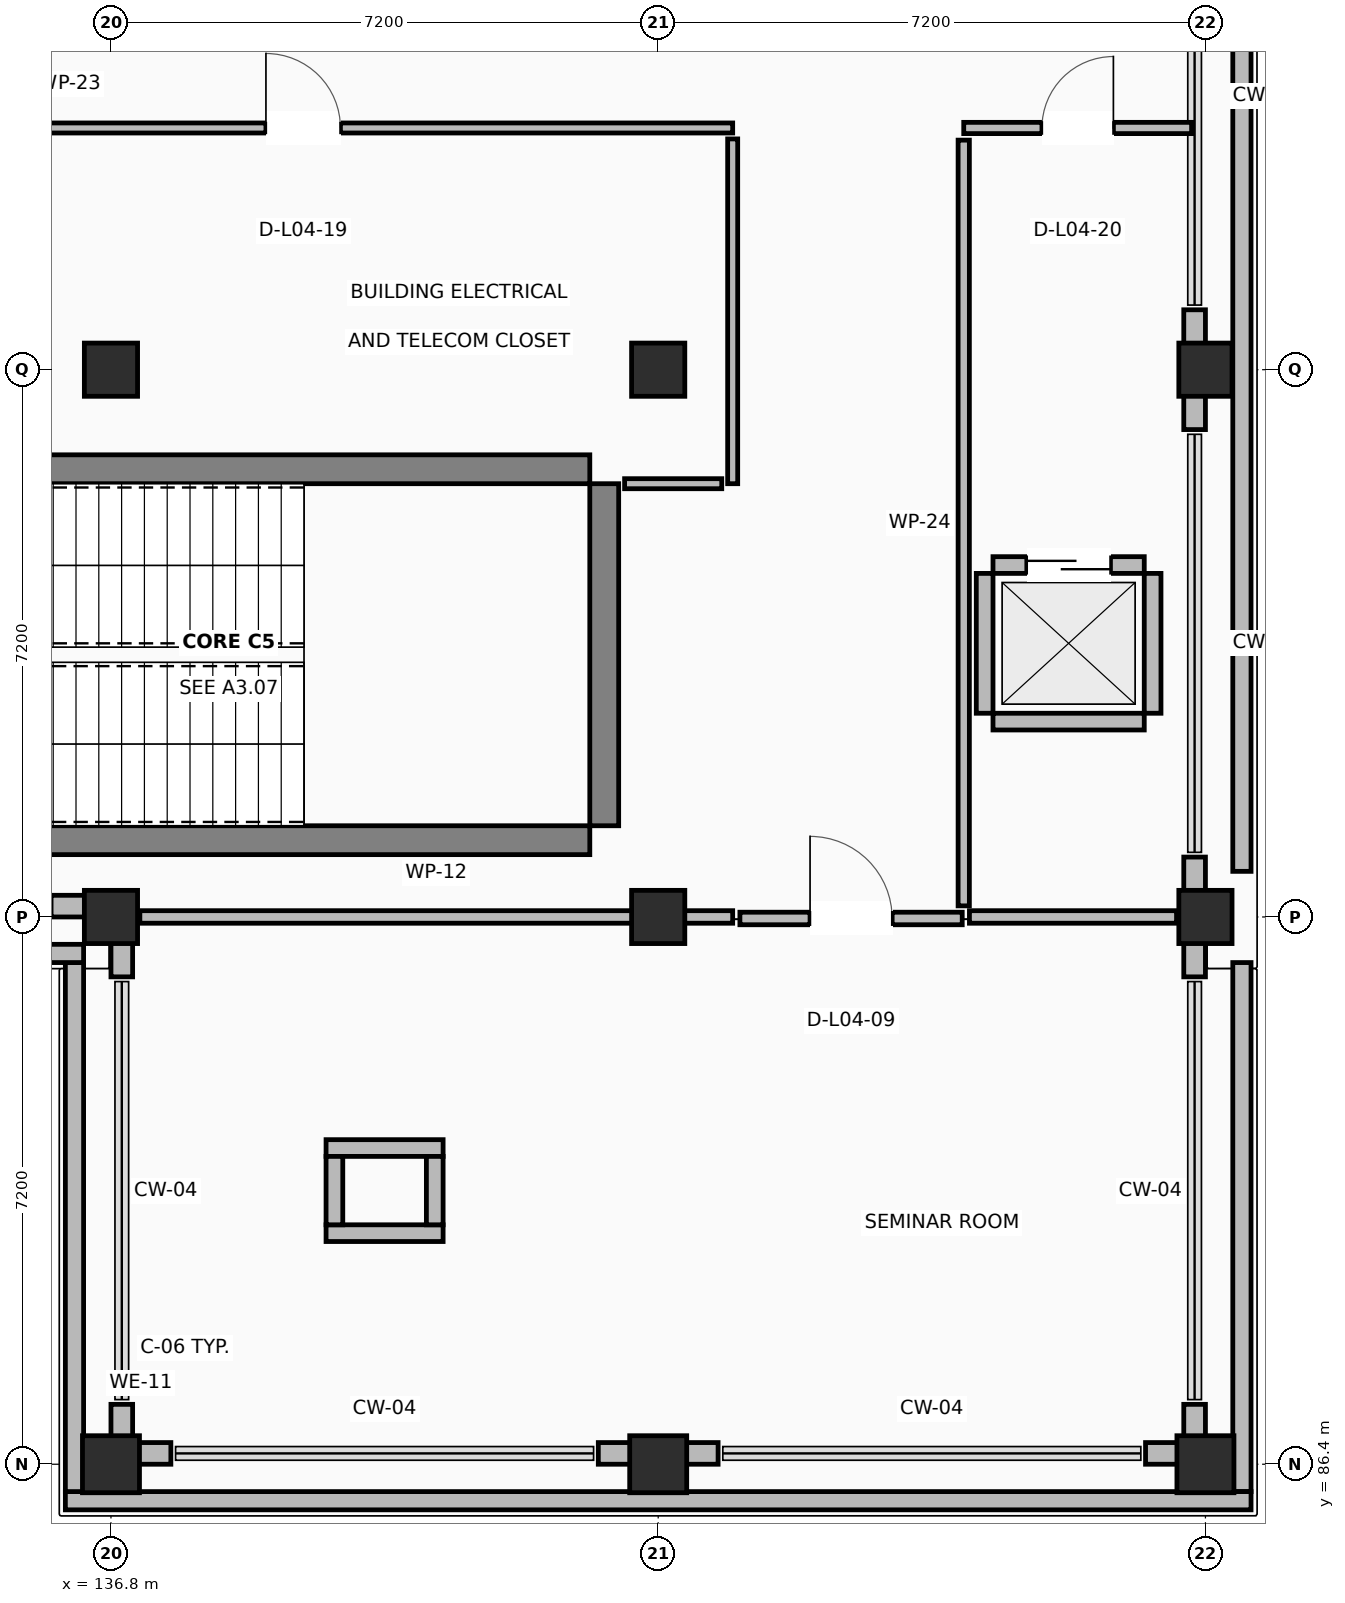
"""IFC4 building model, lengths in metres.
Left out: names, types, materials, properties, quantities, classifications, styles, units other than length and angle.
Written with IfcOpenShell. Run it as: python <this file> out.ifc"""

import sys

from ifc_helpers import new_model, si_unit, direction, frame, frame_2d, origin, origin_2d, place, context, subcontext, project, spatial, rectangle, extrude, element, fill, save


model = new_model("IFC4")
c1 = context("Model", 3, precision=1e-05, world=origin(), true_north=direction((0.0, 1.0)))
c2 = subcontext(c1, "Body", "Model", "MODEL_VIEW")
j1 = project(units=[si_unit("LENGTHUNIT", "METRE"), si_unit("PLANEANGLEUNIT", "RADIAN")], contexts=[c1])
p1 = place(None, origin())
s1 = spatial("IfcSite", under=j1, at=p1, CompositionType="ELEMENT")
p2 = place(p1, origin())
s2 = spatial("IfcBuilding", under=s1, at=p2, CompositionType="ELEMENT")
p3 = place(p2, frame((0.0, 0.0, 18.0)))
s3 = spatial("IfcBuildingStorey", under=s2, at=p3, CompositionType="ELEMENT", Elevation=18.0)
p4 = place(p3, frame((136.8, 86.4, 0.0), z_axis=(0.0, 0.0, 1.0), x_axis=(1.0, 0.0, 0.0)))
e1 = element("IfcColumn", 1, at=p4, inside=s3, PredefinedType="COLUMN", context=c2, shape_type="SweptSolid", body=[
    extrude(rectangle(XDim=0.75, YDim=0.75, at=origin_2d()), origin(), (0.0, 0.0, 1.0), 4.22),
])
for number, where, z_axis, x_axis in (
    (2, (136.8, 93.6, 0.0), (0.0, 0.0, 1.0), (1.0, 0.0, 0.0)),
    (3, (136.8, 100.8, 0.0), (0.0, 0.0, 1.0), (1.0, 0.0, 0.0)),
):
    element("IfcColumn", number, at=place(p3, frame(where, z_axis=z_axis, x_axis=x_axis)), inside=s3, PredefinedType="COLUMN", context=c2, shape_type="SweptSolid", body=[
        extrude(rectangle(XDim=0.7, YDim=0.7, at=origin_2d()), origin(), (0.0, 0.0, 1.0), 4.22),
    ])
p5 = place(p3, frame((144.0, 86.4, 0.0), z_axis=(0.0, 0.0, 1.0), x_axis=(1.0, 0.0, 0.0)))
e4 = element("IfcColumn", 4, at=p5, inside=s3, PredefinedType="COLUMN", context=c2, shape_type="SweptSolid", body=[
    extrude(rectangle(XDim=0.75, YDim=0.75, at=origin_2d()), origin(), (0.0, 0.0, 1.0), 4.22),
])
for number, where, z_axis, x_axis in (
    (5, (144.0, 93.6, 0.0), (0.0, 0.0, 1.0), (1.0, 0.0, 0.0)),
    (6, (144.0, 100.8, 0.0), (0.0, 0.0, 1.0), (1.0, 0.0, 0.0)),
):
    element("IfcColumn", number, at=place(p3, frame(where, z_axis=z_axis, x_axis=x_axis)), inside=s3, PredefinedType="COLUMN", context=c2, shape_type="SweptSolid", body=[
        extrude(rectangle(XDim=0.7, YDim=0.7, at=origin_2d()), origin(), (0.0, 0.0, 1.0), 4.22),
    ])
p6 = place(p3, frame((151.2, 86.4, 0.0), z_axis=(0.0, 0.0, 1.0), x_axis=(1.0, 0.0, 0.0)))
e7 = element("IfcColumn", 7, at=p6, inside=s3, PredefinedType="COLUMN", context=c2, shape_type="SweptSolid", body=[
    extrude(rectangle(XDim=0.75, YDim=0.75, at=origin_2d()), origin(), (0.0, 0.0, 1.0), 4.22),
])
for number, where, z_axis, x_axis in (
    (8, (151.2, 93.6, 0.0), (0.0, 0.0, 1.0), (1.0, 0.0, 0.0)),
    (9, (151.2, 100.8, 0.0), (0.0, 0.0, 1.0), (1.0, 0.0, 0.0)),
):
    element("IfcColumn", number, at=place(p3, frame(where, z_axis=z_axis, x_axis=x_axis)), inside=s3, PredefinedType="COLUMN", context=c2, shape_type="SweptSolid", body=[
        extrude(rectangle(XDim=0.7, YDim=0.7, at=origin_2d()), origin(), (0.0, 0.0, 1.0), 4.22),
    ])
for number, where, z_axis, x_axis in (
    (10, (133.6, 94.61, 0.0), (0.0, 0.0, 1.0), (1.0, 0.0, 0.0)),
    (11, (133.6, 99.49, 0.0), (0.0, 0.0, 1.0), (1.0, 0.0, 0.0)),
):
    element("IfcWall", number, at=place(p3, frame(where, z_axis=z_axis, x_axis=x_axis)), inside=s3, PredefinedType="SHEAR", context=c2, shape_type="SweptSolid", body=[
        extrude(rectangle(XDim=9.5, YDim=0.38, at=frame_2d((4.75, 0.0))), origin(), (0.0, 0.0, 1.0), 4.22),
    ])
p7 = place(p3, frame((143.29, 94.8, 0.0), z_axis=(0.0, 0.0, 1.0), x_axis=(0.0, 1.0, 0.0)))
e12 = element("IfcWall", 12, at=p7, inside=s3, PredefinedType="SHEAR", context=c2, shape_type="SweptSolid", body=[
    extrude(rectangle(XDim=4.5, YDim=0.38, at=frame_2d((2.25, 0.0))), origin(), (0.0, 0.0, 1.0), 4.22),
])
p8 = place(p3, frame((136.8, 86.542, 0.0), z_axis=(0.0, 0.0, 1.0), x_axis=(1.0, 0.0, 0.0)))
e13 = element("IfcWall", 13, at=p8, inside=s3, PredefinedType="STANDARD", context=c2, shape_type="SweptSolid", body=[
    extrude(rectangle(XDim=0.788, YDim=0.285, at=frame_2d((0.394, 0.0))), origin(), (0.0, 0.0, 1.0), 3.26),
])
p9 = place(p3, frame((143.212, 86.542, 0.0), z_axis=(0.0, 0.0, 1.0), x_axis=(1.0, 0.0, 0.0)))
e14 = element("IfcWall", 14, at=p9, inside=s3, PredefinedType="STANDARD", context=c2, shape_type="SweptSolid", body=[
    extrude(rectangle(XDim=1.576, YDim=0.285, at=frame_2d((0.788, 0.0))), origin(), (0.0, 0.0, 1.0), 3.26),
])
p10 = place(p3, frame((150.412, 86.542, 0.0), z_axis=(0.0, 0.0, 1.0), x_axis=(1.0, 0.0, 0.0)))
e15 = element("IfcWall", 15, at=p10, inside=s3, PredefinedType="STANDARD", context=c2, shape_type="SweptSolid", body=[
    extrude(rectangle(XDim=0.788, YDim=0.285, at=frame_2d((0.394, 0.0))), origin(), (0.0, 0.0, 1.0), 3.26),
])
p11 = place(p3, frame((151.058, 86.685, 0.0), z_axis=(0.0, 0.0, 1.0), x_axis=(0.0, 1.0, 0.0)))
e16 = element("IfcWall", 16, at=p11, inside=s3, PredefinedType="STANDARD", context=c2, shape_type="SweptSolid", body=[
    extrude(rectangle(XDim=0.503, YDim=0.285, at=frame_2d((0.251, 0.0))), origin(), (0.0, 0.0, 1.0), 3.26),
])
p12 = place(p3, frame((151.058, 92.812, 0.0), z_axis=(0.0, 0.0, 1.0), x_axis=(0.0, 1.0, 0.0)))
e17 = element("IfcWall", 17, at=p12, inside=s3, PredefinedType="STANDARD", context=c2, shape_type="SweptSolid", body=[
    extrude(rectangle(XDim=0.788, YDim=0.285, at=frame_2d((0.394, 0.0))), origin(), (0.0, 0.0, 1.0), 3.26),
])
p13 = place(p3, frame((151.058, 93.6, 0.0), z_axis=(0.0, 0.0, 1.0), x_axis=(0.0, 1.0, 0.0)))
e18 = element("IfcWall", 18, at=p13, inside=s3, PredefinedType="STANDARD", context=c2, shape_type="SweptSolid", body=[
    extrude(rectangle(XDim=0.788, YDim=0.285, at=frame_2d((0.394, 0.0))), origin(), (0.0, 0.0, 1.0), 3.26),
])
p14 = place(p3, frame((151.058, 100.012, 0.0), z_axis=(0.0, 0.0, 1.0), x_axis=(0.0, 1.0, 0.0)))
e19 = element("IfcWall", 19, at=p14, inside=s3, PredefinedType="STANDARD", context=c2, shape_type="SweptSolid", body=[
    extrude(rectangle(XDim=1.576, YDim=0.285, at=frame_2d((0.788, 0.0))), origin(), (0.0, 0.0, 1.0), 3.26),
])
p15 = place(p3, frame((136.012, 93.742, 0.0), z_axis=(0.0, 0.0, 1.0), x_axis=(1.0, 0.0, 0.0)))
e20 = element("IfcWall", 20, at=p15, inside=s3, PredefinedType="STANDARD", context=c2, shape_type="SweptSolid", body=[
    extrude(rectangle(XDim=0.788, YDim=0.285, at=frame_2d((0.394, 0.0))), origin(), (0.0, 0.0, 1.0), 3.26),
])
p16 = place(p3, frame((136.942, 93.885, 0.0), z_axis=(0.0, 0.0, 1.0), x_axis=(0.0, -1.0, 0.0)))
e21 = element("IfcWall", 21, at=p16, inside=s3, PredefinedType="STANDARD", context=c2, shape_type="SweptSolid", body=[
    extrude(rectangle(XDim=1.073, YDim=0.285, at=frame_2d((0.537, 0.0))), origin(), (0.0, 0.0, 1.0), 3.26),
])
p17 = place(p3, frame((136.942, 87.188, 0.0), z_axis=(0.0, 0.0, 1.0), x_axis=(0.0, -1.0, 0.0)))
e22 = element("IfcWall", 22, at=p17, inside=s3, PredefinedType="STANDARD", context=c2, shape_type="SweptSolid", body=[
    extrude(rectangle(XDim=0.503, YDim=0.285, at=frame_2d((0.251, 0.0))), origin(), (0.0, 0.0, 1.0), 3.26),
])
p18 = place(p3, frame((151.68, 115.56, 0.0), z_axis=(0.0, 0.0, 1.0), x_axis=(0.0, -1.0, 0.0)))
e23 = element("IfcWall", 23, at=p18, inside=s3, PredefinedType="PARAPET", context=c2, shape_type="SweptSolid", body=[
    extrude(rectangle(XDim=21.36, YDim=0.24, at=frame_2d((10.68, 0.0))), origin(), (0.0, 0.0, 1.0), 1.12),
])
p19 = place(p3, frame((151.68, 93.0, 0.0), z_axis=(0.0, 0.0, 1.0), x_axis=(0.0, -1.0, 0.0)))
e24 = element("IfcWall", 24, at=p19, inside=s3, PredefinedType="PARAPET", context=c2, shape_type="SweptSolid", body=[
    extrude(rectangle(XDim=6.96, YDim=0.24, at=frame_2d((3.48, 0.0))), origin(), (0.0, 0.0, 1.0), 1.12),
])
p20 = place(p3, frame((151.8, 85.92, 0.0), z_axis=(0.0, 0.0, 1.0), x_axis=(-1.0, 0.0, 0.0)))
e25 = element("IfcWall", 25, at=p20, inside=s3, PredefinedType="PARAPET", context=c2, shape_type="SweptSolid", body=[
    extrude(rectangle(XDim=15.6, YDim=0.24, at=frame_2d((7.8, 0.0))), origin(), (0.0, 0.0, 1.0), 1.12),
])
p21 = place(p3, frame((136.32, 86.04, 0.0), z_axis=(0.0, 0.0, 1.0), x_axis=(0.0, 1.0, 0.0)))
e26 = element("IfcWall", 26, at=p21, inside=s3, PredefinedType="PARAPET", context=c2, shape_type="SweptSolid", body=[
    extrude(rectangle(XDim=6.96, YDim=0.24, at=frame_2d((3.48, 0.0))), origin(), (0.0, 0.0, 1.0), 1.12),
])
p22 = place(p3, frame((136.44, 93.12, 0.0), z_axis=(0.0, 0.0, 1.0), x_axis=(-1.0, 0.0, 0.0)))
e27 = element("IfcWall", 27, at=p22, inside=s3, PredefinedType="PARAPET", context=c2, shape_type="SweptSolid", body=[
    extrude(rectangle(XDim=57.84, YDim=0.24, at=frame_2d((28.92, 0.0))), origin(), (0.0, 0.0, 1.0), 1.12),
])
p23 = place(p3, frame((148.405, 96.17, 0.0), z_axis=(0.0, 0.0, 1.0), x_axis=(1.0, 0.0, 0.0)))
e28 = element("IfcWall", 28, at=p23, inside=s3, PredefinedType="STANDARD", context=c2, shape_type="SweptSolid", body=[
    extrude(rectangle(XDim=1.99, YDim=0.22, at=frame_2d((0.995, 0.0))), origin(), (0.0, 0.0, 1.0), 3.26),
])
p24 = place(p3, frame((148.405, 98.23, 0.0), z_axis=(0.0, 0.0, 1.0), x_axis=(1.0, 0.0, 0.0)))
e29 = element("IfcWall", 29, at=p24, inside=s3, PredefinedType="STANDARD", context=c2, shape_type="SweptSolid", body=[
    extrude(rectangle(XDim=1.99, YDim=0.22, at=frame_2d((0.995, 0.0))), origin(), (0.0, 0.0, 1.0), 3.26),
])
p25 = place(p24, frame((0.445, 0.0, 0.0)))
e30 = element("IfcOpeningElement", 30, at=p25, cuts=e29, PredefinedType="OPENING", context=c2, shape_type="SweptSolid", body=[
    extrude(rectangle(XDim=1.1, YDim=2.15, at=frame_2d((0.55, 1.075))), frame((0.0, 0.12, 0.0), z_axis=(0.0, -1.0, 0.0), x_axis=(1.0, 0.0, 0.0)), (0.0, 0.0, 1.0), 0.24),
])
for number, where, z_axis, x_axis in (
    (31, (148.295, 96.28, 0.0), (0.0, 0.0, 1.0), (0.0, 1.0, 0.0)),
    (32, (150.505, 96.28, 0.0), (0.0, 0.0, 1.0), (0.0, 1.0, 0.0)),
):
    element("IfcWall", number, at=place(p3, frame(where, z_axis=z_axis, x_axis=x_axis)), inside=s3, PredefinedType="STANDARD", context=c2, shape_type="SweptSolid", body=[
        extrude(rectangle(XDim=1.84, YDim=0.22, at=frame_2d((0.92, 0.0))), origin(), (0.0, 0.0, 1.0), 3.26),
    ])
for number, where, z_axis, x_axis in (
    (33, (139.63, 89.44, 0.0), (0.0, 0.0, 1.0), (1.0, 0.0, 0.0)),
    (34, (139.63, 90.56, 0.0), (0.0, 0.0, 1.0), (1.0, 0.0, 0.0)),
):
    element("IfcWall", number, at=place(p3, frame(where, z_axis=z_axis, x_axis=x_axis)), inside=s3, PredefinedType="STANDARD", context=c2, shape_type="SweptSolid", body=[
        extrude(rectangle(XDim=1.54, YDim=0.22, at=frame_2d((0.77, 0.0))), origin(), (0.0, 0.0, 1.0), 3.26),
    ])
for number, where, z_axis, x_axis in (
    (35, (139.74, 89.55, 0.0), (0.0, 0.0, 1.0), (0.0, 1.0, 0.0)),
    (36, (141.06, 89.55, 0.0), (0.0, 0.0, 1.0), (0.0, 1.0, 0.0)),
):
    element("IfcWall", number, at=place(p3, frame(where, z_axis=z_axis, x_axis=x_axis)), inside=s3, PredefinedType="STANDARD", context=c2, shape_type="SweptSolid", body=[
        extrude(rectangle(XDim=0.9, YDim=0.22, at=frame_2d((0.45, 0.0))), origin(), (0.0, 0.0, 1.0), 3.26),
    ])
p26 = place(p3, frame((137.18, 93.6, 0.0), z_axis=(0.0, 0.0, 1.0), x_axis=(1.0, 0.0, 0.0)))
e37 = element("IfcWall", 37, at=p26, inside=s3, PredefinedType="PARTITIONING", context=c2, shape_type="SweptSolid", body=[
    extrude(rectangle(XDim=7.8, YDim=0.165, at=frame_2d((3.9, 0.0))), origin(), (0.0, 0.0, 1.0), 3.26),
])
p27 = place(p3, frame((145.075, 93.58, 0.0), z_axis=(0.0, 0.0, 1.0), x_axis=(1.0, 0.0, 0.0)))
e38 = element("IfcWall", 38, at=p27, inside=s3, PredefinedType="PARTITIONING", context=c2, shape_type="SweptSolid", body=[
    extrude(rectangle(XDim=2.925, YDim=0.165, at=frame_2d((1.462, 0.0))), origin(), (0.0, 0.0, 1.0), 3.26),
])
p28 = place(p27, frame((0.923, 0.0, 0.0)))
e39 = element("IfcOpeningElement", 39, at=p28, cuts=e38, PredefinedType="OPENING", context=c2, shape_type="SweptSolid", body=[
    extrude(rectangle(XDim=1.08, YDim=2.15, at=frame_2d((0.54, 1.075))), frame((0.0, 0.093, 0.0), z_axis=(0.0, -1.0, 0.0), x_axis=(1.0, 0.0, 0.0)), (0.0, 0.0, 1.0), 0.185),
])
p29 = place(p3, frame((148.095, 93.6, 0.0), z_axis=(0.0, 0.0, 1.0), x_axis=(1.0, 0.0, 0.0)))
e40 = element("IfcWall", 40, at=p29, inside=s3, PredefinedType="PARTITIONING", context=c2, shape_type="SweptSolid", body=[
    extrude(rectangle(XDim=2.725, YDim=0.165, at=frame_2d((1.363, 0.0))), origin(), (0.0, 0.0, 1.0), 3.26),
])
p30 = place(p3, frame((133.678, 103.98, 0.0), z_axis=(0.0, 0.0, 1.0), x_axis=(1.0, 0.0, 0.0)))
e41 = element("IfcWall", 41, at=p30, inside=s3, PredefinedType="PARTITIONING", context=c2, shape_type="SweptSolid", body=[
    extrude(rectangle(XDim=11.302, YDim=0.132, at=frame_2d((5.651, 0.0))), origin(), (0.0, 0.0, 1.0), 3.26),
])
p31 = place(p30, frame((5.161, 0.0, 0.0)))
e42 = element("IfcOpeningElement", 42, at=p31, cuts=e41, PredefinedType="OPENING", context=c2, shape_type="SweptSolid", body=[
    extrude(rectangle(XDim=0.98, YDim=2.1, at=frame_2d((0.49, 1.05))), frame((0.0, 0.076, 0.0), z_axis=(0.0, -1.0, 0.0), x_axis=(1.0, 0.0, 0.0)), (0.0, 0.0, 1.0), 0.152),
])
p32 = place(p3, frame((144.98, 103.836, 0.0), z_axis=(0.0, 0.0, 1.0), x_axis=(0.0, -1.0, 0.0)))
e43 = element("IfcWall", 43, at=p32, inside=s3, PredefinedType="PARTITIONING", context=c2, shape_type="SweptSolid", body=[
    extrude(rectangle(XDim=4.536, YDim=0.132, at=frame_2d((2.268, 0.0))), origin(), (0.0, 0.0, 1.0), 3.26),
])
p33 = place(p3, frame((144.836, 99.3, 0.0), z_axis=(0.0, 0.0, 1.0), x_axis=(-1.0, 0.0, 0.0)))
e44 = element("IfcWall", 44, at=p33, inside=s3, PredefinedType="PARTITIONING", context=c2, shape_type="SweptSolid", body=[
    extrude(rectangle(XDim=1.278, YDim=0.132, at=frame_2d((0.639, 0.0))), origin(), (0.0, 0.0, 1.0), 3.26),
])
p34 = place(p3, frame((148.02, 103.98, 0.0), z_axis=(0.0, 0.0, 1.0), x_axis=(1.0, 0.0, 0.0)))
e45 = element("IfcWall", 45, at=p34, inside=s3, PredefinedType="PARTITIONING", context=c2, shape_type="SweptSolid", body=[
    extrude(rectangle(XDim=2.998, YDim=0.148, at=frame_2d((1.499, 0.0))), origin(), (0.0, 0.0, 1.0), 3.26),
])
p35 = place(p34, frame((1.029, 0.0, 0.0)))
e46 = element("IfcOpeningElement", 46, at=p35, cuts=e45, PredefinedType="OPENING", context=c2, shape_type="SweptSolid", body=[
    extrude(rectangle(XDim=0.94, YDim=2.1, at=frame_2d((0.47, 1.05))), frame((0.0, 0.084, 0.0), z_axis=(0.0, -1.0, 0.0), x_axis=(1.0, 0.0, 0.0)), (0.0, 0.0, 1.0), 0.168),
])
p36 = place(p3, frame((148.02, 93.746, 0.0), z_axis=(0.0, 0.0, 1.0), x_axis=(0.0, 1.0, 0.0)))
e47 = element("IfcWall", 47, at=p36, inside=s3, PredefinedType="PARTITIONING", context=c2, shape_type="SweptSolid", body=[
    extrude(rectangle(XDim=10.074, YDim=0.148, at=frame_2d((5.037, 0.0))), origin(), (0.0, 0.0, 1.0), 3.26),
])
p37 = place(p25, origin())
e48 = element("IfcDoor", 48, at=p37, inside=s3, OperationType="SLIDING_TO_LEFT", PredefinedType="DOOR", context=c2, shape_type="SweptSolid", body=[
    extrude(rectangle(XDim=1.1, YDim=2.15, at=frame_2d((0.55, 1.075))), frame((0.0, 0.025, 0.0), z_axis=(0.0, -1.0, 0.0), x_axis=(1.0, 0.0, 0.0)), (0.0, 0.0, 1.0), 0.05),
])
fill(e30, e48)
p38 = place(p28, origin())
e49 = element("IfcDoor", 49, at=p38, inside=s3, OperationType="SINGLE_SWING_LEFT", PredefinedType="DOOR", context=c2, shape_type="SweptSolid", body=[
    extrude(rectangle(XDim=1.08, YDim=2.15, at=frame_2d((0.54, 1.075))), frame((0.0, 0.025, 0.0), z_axis=(0.0, -1.0, 0.0), x_axis=(1.0, 0.0, 0.0)), (0.0, 0.0, 1.0), 0.05),
])
fill(e39, e49)
p39 = place(p31, origin())
e50 = element("IfcDoor", 50, at=p39, inside=s3, OperationType="SINGLE_SWING_LEFT", PredefinedType="DOOR", context=c2, shape_type="SweptSolid", body=[
    extrude(rectangle(XDim=0.98, YDim=2.1, at=frame_2d((0.49, 1.05))), frame((0.0, 0.025, 0.0), z_axis=(0.0, -1.0, 0.0), x_axis=(1.0, 0.0, 0.0)), (0.0, 0.0, 1.0), 0.05),
])
fill(e42, e50)
p40 = place(p35, origin())
e51 = element("IfcDoor", 51, at=p40, inside=s3, OperationType="SINGLE_SWING_RIGHT", PredefinedType="DOOR", context=c2, shape_type="SweptSolid", body=[
    extrude(rectangle(XDim=0.94, YDim=2.1, at=frame_2d((0.47, 1.05))), frame((0.0, 0.025, 0.0), z_axis=(0.0, -1.0, 0.0), x_axis=(1.0, 0.0, 0.0)), (0.0, 0.0, 1.0), 0.05),
])
fill(e46, e51)
save(model, sys.argv[1])
